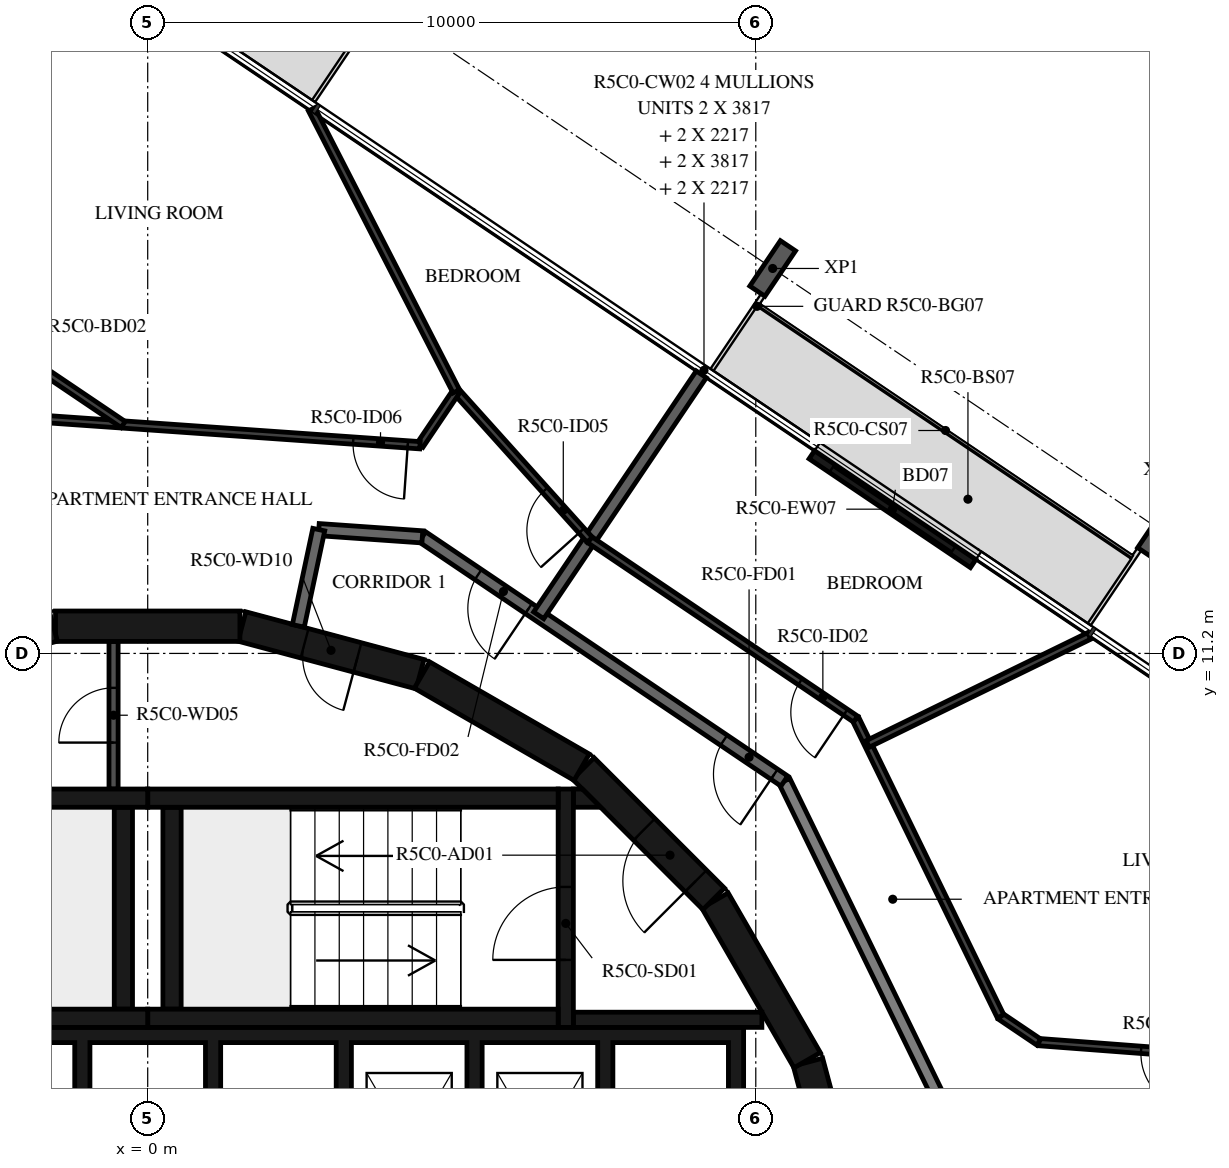
"""IFC4 building model, lengths in metres.
Left out: names, types, materials, properties, quantities, classifications, styles, units other than length and angle.
Written with IfcOpenShell. Run it as: python <this file> out.ifc"""

import sys

from ifc_helpers import new_model, si_unit, direction, frame, frame_2d, origin, origin_2d, place, context, subcontext, project, spatial, polyline, rectangle, i_section, outline, extrude, element, fill, save


model = new_model("IFC4")
c1 = context("Model", 3, precision=1e-05, world=origin(), true_north=direction((0.0, 1.0)))
c2 = subcontext(c1, "Body", "Model", "MODEL_VIEW")
j1 = project(units=[si_unit("LENGTHUNIT", "METRE"), si_unit("PLANEANGLEUNIT", "RADIAN")], contexts=[c1])
p1 = place(None, origin())
s1 = spatial("IfcSite", under=j1, at=p1, CompositionType="ELEMENT")
p2 = place(p1, origin())
s2 = spatial("IfcBuilding", under=s1, at=p2, CompositionType="ELEMENT")
p3 = place(p2, frame((0.0, 0.0, 216.4)))
s3 = spatial("IfcBuildingStorey", under=s2, at=p3, CompositionType="ELEMENT", Elevation=216.4)
for number, where, z_axis, x_axis in (
    (1, (16.656, 13.228, -0.38), (0.0, 0.0, 1.0), (0.829, -0.559, 0.0)),
    (2, (10.278, 17.531, -0.38), (0.0, 0.0, 1.0), (0.829, -0.559, 0.0)),
):
    element("IfcColumn", number, at=place(p3, frame(where, z_axis=z_axis, x_axis=x_axis)), inside=s3, PredefinedType="COLUMN", context=c2, shape_type="SweptSolid", body=[
        extrude(i_section(OverallWidth=0.3, OverallDepth=0.9, WebThickness=0.019, FlangeThickness=0.035, FilletRadius=0.03, at=origin_2d()), origin(), (0.0, 0.0, 1.0), 2.616),
    ])
p4 = place(p3, frame((13.574, 12.677, 0.0), z_axis=(0.0, 0.0, 1.0), x_axis=(-0.829068838882, 0.55914654644, 0.0)))
e3 = element("IfcWall", 3, at=p4, inside=s3, PredefinedType="STANDARD", context=c2, shape_type="SweptSolid", body=[
    extrude(rectangle(XDim=3.2, YDim=0.16, at=frame_2d((1.6, 0.0))), origin(), (0.0, 0.0, 1.0), 3.05),
])
p5 = place(p4, frame((0.4, 0.0, 0.0)))
e4 = element("IfcOpeningElement", 4, at=p5, cuts=e3, PredefinedType="OPENING", context=c2, shape_type="SweptSolid", body=[
    extrude(rectangle(XDim=2.4, YDim=2.4, at=frame_2d((1.2, 1.2))), frame((0.0, 0.09, 0.0), z_axis=(0.0, -1.0, 0.0), x_axis=(1.0, 0.0, 0.0)), (0.0, 0.0, 1.0), 0.18),
])
for number, where, z_axis, x_axis in (
    (5, (11.643, 1.55, 0.0), (0.0, 0.0, 1.0), (-0.259, 0.966, 0.0)),
    (6, (10.845, 4.51, 0.0), (0.0, 0.0, 1.0), (-0.5, 0.866, 0.0)),
):
    element("IfcWall", number, at=place(p3, frame(where, z_axis=z_axis, x_axis=x_axis)), inside=s3, PredefinedType="SHEAR", context=c2, shape_type="SweptSolid", body=[
        extrude(rectangle(XDim=3.033, YDim=0.5, at=frame_2d((1.516, 0.0))), origin(), (0.0, 0.0, 1.0), 3.05),
    ])
p6 = place(p3, frame((9.308, 7.164, 0.0), z_axis=(0.0, 0.0, 1.0), x_axis=(-0.707106781187, 0.707106781187, 0.0)))
e7 = element("IfcWall", 7, at=p6, inside=s3, PredefinedType="SHEAR", context=c2, shape_type="SweptSolid", body=[
    extrude(rectangle(XDim=3.032, YDim=0.5, at=frame_2d((1.516, 0.0))), origin(), (0.0, 0.0, 1.0), 3.05),
])
p7 = place(p6, frame((0.416, 0.0, 0.0)))
e8 = element("IfcOpeningElement", 8, at=p7, cuts=e7, PredefinedType="OPENING", context=c2, shape_type="SweptSolid", body=[
    extrude(rectangle(XDim=1.2, YDim=2.1, at=frame_2d((0.6, 1.05))), frame((0.0, 0.26, 0.0), z_axis=(0.0, -1.0, 0.0), x_axis=(1.0, 0.0, 0.0)), (0.0, 0.0, 1.0), 0.52),
])
p8 = place(p3, frame((7.137, 9.329, 0.0), z_axis=(0.0, 0.0, 1.0), x_axis=(-0.865975092491, 0.500087131594, 0.0)))
e9 = element("IfcWall", 9, at=p8, inside=s3, PredefinedType="SHEAR", context=c2, shape_type="SweptSolid", body=[
    extrude(rectangle(XDim=3.033, YDim=0.5, at=frame_2d((1.516, 0.0))), origin(), (0.0, 0.0, 1.0), 3.05),
])
p9 = place(p3, frame((4.479, 10.858, 0.0), z_axis=(0.0, 0.0, 1.0), x_axis=(-0.965948410781, 0.258734743916, 0.0)))
e10 = element("IfcWall", 10, at=p9, inside=s3, PredefinedType="SHEAR", context=c2, shape_type="SweptSolid", body=[
    extrude(rectangle(XDim=3.033, YDim=0.5, at=frame_2d((1.516, 0.0))), origin(), (0.0, 0.0, 1.0), 3.05),
])
p10 = place(p9, frame((1.066, 0.0, 0.0)))
e11 = element("IfcOpeningElement", 11, at=p10, cuts=e10, PredefinedType="OPENING", context=c2, shape_type="SweptSolid", body=[
    extrude(rectangle(XDim=0.9, YDim=2.1, at=frame_2d((0.45, 1.05))), frame((0.0, 0.26, 0.0), z_axis=(0.0, -1.0, 0.0), x_axis=(1.0, 0.0, 0.0)), (0.0, 0.0, 1.0), 0.52),
])
for number, where, z_axis, x_axis in (
    (12, (1.516, 11.647, 0.0), (0.0, 0.0, 1.0), (-1.0, 0.0, 0.0)),
    (13, (-1.55, 11.643, 0.0), (0.0, 0.0, 1.0), (-0.966, -0.259, 0.0)),
):
    element("IfcWall", number, at=place(p3, frame(where, z_axis=z_axis, x_axis=x_axis)), inside=s3, PredefinedType="SHEAR", context=c2, shape_type="SweptSolid", body=[
        extrude(rectangle(XDim=3.033, YDim=0.5, at=frame_2d((1.516, 0.0))), origin(), (0.0, 0.0, 1.0), 3.05),
    ])
for number, where, z_axis, x_axis in (
    (14, (0.0, 5.2, 0.0), (0.0, 0.0, 1.0), (1.0, 0.0, 0.0)),
    (15, (0.0, 8.82, 0.0), (0.0, 0.0, 1.0), (1.0, 0.0, 0.0)),
):
    element("IfcWall", number, at=place(p3, frame(where, z_axis=z_axis, x_axis=x_axis)), inside=s3, PredefinedType="SHEAR", context=c2, shape_type="SweptSolid", body=[
        extrude(rectangle(XDim=6.75, YDim=0.3, at=frame_2d((3.375, 0.0))), origin(), (0.0, 0.0, 1.0), 3.05),
    ])
p11 = place(p3, frame((0.4, 5.35, 0.0), z_axis=(0.0, 0.0, 1.0), x_axis=(0.0, 1.0, 0.0)))
e16 = element("IfcWall", 16, at=p11, inside=s3, PredefinedType="SHEAR", context=c2, shape_type="SweptSolid", body=[
    extrude(rectangle(XDim=3.32, YDim=0.3, at=frame_2d((1.66, 0.0))), origin(), (0.0, 0.0, 1.0), 3.05),
])
p12 = place(p3, frame((6.875, 5.05, 0.0), z_axis=(0.0, 0.0, 1.0), x_axis=(0.0, 1.0, 0.0)))
e17 = element("IfcWall", 17, at=p12, inside=s3, PredefinedType="SHEAR", context=c2, shape_type="SweptSolid", body=[
    extrude(rectangle(XDim=3.92, YDim=0.25, at=frame_2d((1.96, 0.0))), origin(), (0.0, 0.0, 1.0), 3.05),
])
p13 = place(p12, frame((1.11, 0.0, 0.0)))
e18 = element("IfcOpeningElement", 18, at=p13, cuts=e17, PredefinedType="OPENING", context=c2, shape_type="SweptSolid", body=[
    extrude(rectangle(XDim=1.2, YDim=2.1, at=frame_2d((0.6, 1.05))), frame((0.0, 0.135, 0.0), z_axis=(0.0, -1.0, 0.0), x_axis=(1.0, 0.0, 0.0)), (0.0, 0.0, 1.0), 0.27),
])
p14 = place(p3, frame((7.0, 5.175, 0.0), z_axis=(0.0, 0.0, 1.0), x_axis=(1.0, 0.0, 0.0)))
e19 = element("IfcWall", 19, at=p14, inside=s3, PredefinedType="SHEAR", context=c2, shape_type="SweptSolid", body=[
    extrude(rectangle(XDim=3.1, YDim=0.25, at=frame_2d((1.55, 0.0))), origin(), (0.0, 0.0, 1.0), 3.05),
])
p15 = place(p3, origin())
e20 = element("IfcWall", 20, at=p15, inside=s3, PredefinedType="SHEAR", context=c2, shape_type="SweptSolid", body=[
    extrude(outline(polyline([(7.448, 8.67), (7.0, 8.67), (7.0, 8.97), (7.148, 8.97), (7.448, 8.67)])), origin(), (0.0, 0.0, 1.0), 3.05),
])
for number, where, z_axis, x_axis in (
    (21, (-6.75, 5.2, 0.0), (0.0, 0.0, 1.0), (1.0, 0.0, 0.0)),
    (22, (-6.75, 8.82, 0.0), (0.0, 0.0, 1.0), (1.0, 0.0, 0.0)),
):
    element("IfcWall", number, at=place(p3, frame(where, z_axis=z_axis, x_axis=x_axis)), inside=s3, PredefinedType="SHEAR", context=c2, shape_type="SweptSolid", body=[
        extrude(rectangle(XDim=6.75, YDim=0.3, at=frame_2d((3.375, 0.0))), origin(), (0.0, 0.0, 1.0), 3.05),
    ])
p16 = place(p3, frame((-0.4, 5.35, 0.0), z_axis=(0.0, 0.0, 1.0), x_axis=(0.0, 1.0, 0.0)))
e23 = element("IfcWall", 23, at=p16, inside=s3, PredefinedType="SHEAR", context=c2, shape_type="SweptSolid", body=[
    extrude(rectangle(XDim=3.32, YDim=0.3, at=frame_2d((1.66, 0.0))), origin(), (0.0, 0.0, 1.0), 3.05),
])
p17 = place(p3, origin())
e24 = element("IfcWall", 24, at=p17, inside=s3, PredefinedType="SHEAR", context=c2, shape_type="SweptSolid", body=[
    extrude(outline(polyline([(-9.55, 4.8), (-5.5, 4.8), (-5.5, 1.9), (-5.25, 1.9), (-5.25, 4.8), (-1.2, 4.8), (-1.2, 1.9), (-0.95, 1.9), (-0.95, 4.8), (0.95, 4.8), (0.95, 1.9), (1.2, 1.9), (1.2, 4.8), (3.1, 4.8), (3.1, 1.9), (3.35, 1.9), (3.35, 4.8), (5.25, 4.8), (5.25, 1.9), (5.5, 1.9), (5.5, 4.8), (7.4, 4.8), (7.4, 1.9), (7.65, 1.9), (7.65, 4.8), (9.55, 4.8), (9.55, 1.9), (9.8, 1.9), (9.8, 4.8), (9.8, 5.05), (-9.8, 5.05), (-9.8, 4.8), (-9.8, 1.9), (-9.55, 1.9), (-9.55, 4.8)])), origin(), (0.0, 0.0, 1.0), 3.05),
])
p18 = place(p3, frame((-0.562, 8.97, 0.0), z_axis=(0.0, 0.0, 1.0), x_axis=(0.0, 1.0, 0.0)))
e25 = element("IfcWall", 25, at=p18, inside=s3, PredefinedType="PARTITIONING", context=c2, shape_type="SweptSolid", body=[
    extrude(rectangle(XDim=2.427, YDim=0.15, at=frame_2d((1.214, 0.0))), origin(), (0.0, 0.0, 1.0), 3.05),
])
p19 = place(p18, frame((0.764, 0.0, 0.0)))
e26 = element("IfcOpeningElement", 26, at=p19, cuts=e25, PredefinedType="OPENING", context=c2, shape_type="SweptSolid", body=[
    extrude(rectangle(XDim=0.9, YDim=2.1, at=frame_2d((0.45, 1.05))), frame((0.0, 0.085, 0.0), z_axis=(0.0, -1.0, 0.0), x_axis=(1.0, 0.0, 0.0)), (0.0, 0.0, 1.0), 0.17),
])
p20 = place(p3, frame((13.618, 2.647, 0.0), z_axis=(0.0, 0.0, 1.0), x_axis=(-0.438366026218, 0.898796543751, 0.0)))
e27 = element("IfcWall", 27, at=p20, inside=s3, PredefinedType="STANDARD", context=c2, shape_type="SweptSolid", body=[
    extrude(rectangle(XDim=7.181, YDim=0.2, at=frame_2d((3.591, 0.0))), origin(), (0.0, 0.0, 1.0), 3.05),
])
p21 = place(p3, frame((10.47, 9.101, 0.0), z_axis=(0.0, 0.0, 1.0), x_axis=(-0.829035841718, 0.559195469534, 0.0)))
e28 = element("IfcWall", 28, at=p21, inside=s3, PredefinedType="STANDARD", context=c2, shape_type="SweptSolid", body=[
    extrude(rectangle(XDim=7.181, YDim=0.2, at=frame_2d((3.591, 0.0))), origin(), (0.0, 0.0, 1.0), 3.05),
])
p22 = place(p21, frame((0.2, 0.0, 0.0)))
e29 = element("IfcOpeningElement", 29, at=p22, cuts=e28, PredefinedType="OPENING", context=c2, shape_type="SweptSolid", body=[
    extrude(rectangle(XDim=1.0, YDim=2.1, at=frame_2d((0.5, 1.05))), frame((0.0, 0.11, 0.0), z_axis=(0.0, -1.0, 0.0), x_axis=(1.0, 0.0, 0.0)), (0.0, 0.0, 1.0), 0.22),
])
p23 = place(p21, frame((5.073, 0.0, 0.0)))
e30 = element("IfcOpeningElement", 30, at=p23, cuts=e28, PredefinedType="OPENING", context=c2, shape_type="SweptSolid", body=[
    extrude(rectangle(XDim=1.0, YDim=2.1, at=frame_2d((0.5, 1.05))), frame((0.0, 0.11, 0.0), z_axis=(0.0, -1.0, 0.0), x_axis=(1.0, 0.0, 0.0)), (0.0, 0.0, 1.0), 0.22),
])
p24 = place(p3, frame((4.517, 13.117, 0.0), z_axis=(0.0, 0.0, 1.0), x_axis=(-0.997562153664, 0.069783591025, 0.0)))
e31 = element("IfcWall", 31, at=p24, inside=s3, PredefinedType="STANDARD", context=c2, shape_type="SweptSolid", body=[
    extrude(rectangle(XDim=1.707, YDim=0.2, at=frame_2d((0.854, 0.0))), origin(), (0.0, 0.0, 1.0), 3.05),
])
p25 = place(p3, frame((2.813, 13.236, 0.0), z_axis=(0.0, 0.0, 1.0), x_axis=(-0.207911086063, -0.978147729278, 0.0)))
e32 = element("IfcWall", 32, at=p25, inside=s3, PredefinedType="STANDARD", context=c2, shape_type="SweptSolid", body=[
    extrude(rectangle(XDim=1.618, YDim=0.2, at=frame_2d((0.809, 0.0))), origin(), (0.0, 0.0, 1.0), 3.05),
])
p26 = place(p3, frame((9.104, 15.79, 0.0), z_axis=(0.0, 0.0, 1.0), x_axis=(-0.559193912135, -0.829036892201, 0.0)))
e33 = element("IfcWall", 33, at=p26, inside=s3, PredefinedType="STANDARD", context=c2, shape_type="SweptSolid", body=[
    extrude(rectangle(XDim=4.781, YDim=0.2, at=frame_2d((2.39, 0.0))), origin(), (0.0, 0.0, 1.0), 3.05),
])
p27 = place(p3, frame((17.434, 4.598, 0.0), z_axis=(0.0, 0.0, 1.0), x_axis=(-0.997152077354, 0.075417071205, 0.0)))
e34 = element("IfcWall", 34, at=p27, inside=s3, PredefinedType="PARTITIONING", context=c2, shape_type="SweptSolid", body=[
    extrude(rectangle(XDim=2.787, YDim=0.12, at=frame_2d((1.394, 0.0))), origin(), (0.0, 0.0, 1.0), 3.05),
])
p28 = place(p27, frame((0.2, 0.0, 0.0)))
e35 = element("IfcOpeningElement", 35, at=p28, cuts=e34, PredefinedType="OPENING", context=c2, shape_type="SweptSolid", body=[
    extrude(rectangle(XDim=0.9, YDim=2.1, at=frame_2d((0.45, 1.05))), frame((0.0, 0.07, 0.0), z_axis=(0.0, -1.0, 0.0), x_axis=(1.0, 0.0, 0.0)), (0.0, 0.0, 1.0), 0.14),
])
p29 = place(p3, frame((14.654, 4.808, 0.0), z_axis=(0.0, 0.0, 1.0), x_axis=(-0.829065184024, 0.559151965604, 0.0)))
e36 = element("IfcWall", 36, at=p29, inside=s3, PredefinedType="PARTITIONING", context=c2, shape_type="SweptSolid", body=[
    extrude(rectangle(XDim=0.758, YDim=0.12, at=frame_2d((0.379, 0.0))), origin(), (0.0, 0.0, 1.0), 3.05),
])
p30 = place(p3, frame((14.026, 5.232, 0.0), z_axis=(0.0, 0.0, 1.0), x_axis=(-0.438374985284, 0.89879217413, 0.0)))
e37 = element("IfcWall", 37, at=p30, inside=s3, PredefinedType="PARTITIONING", context=c2, shape_type="SweptSolid", body=[
    extrude(rectangle(XDim=5.438, YDim=0.12, at=frame_2d((2.719, 0.0))), origin(), (0.0, 0.0, 1.0), 3.05),
])
p31 = place(p3, frame((11.642, 10.12, 0.0), z_axis=(0.0, 0.0, 1.0), x_axis=(-0.829054664054, 0.559167563446, 0.0)))
e38 = element("IfcWall", 38, at=p31, inside=s3, PredefinedType="PARTITIONING", context=c2, shape_type="SweptSolid", body=[
    extrude(rectangle(XDim=5.275, YDim=0.12, at=frame_2d((2.637, 0.0))), origin(), (0.0, 0.0, 1.0), 3.05),
])
p32 = place(p31, frame((0.2, 0.0, 0.0)))
e39 = element("IfcOpeningElement", 39, at=p32, cuts=e38, PredefinedType="OPENING", context=c2, shape_type="SweptSolid", body=[
    extrude(rectangle(XDim=0.9, YDim=2.1, at=frame_2d((0.45, 1.05))), frame((0.0, 0.07, 0.0), z_axis=(0.0, -1.0, 0.0), x_axis=(1.0, 0.0, 0.0)), (0.0, 0.0, 1.0), 0.14),
])
p33 = place(p3, frame((15.482, 11.487, 0.0), z_axis=(0.0, 0.0, 1.0), x_axis=(-0.898807251285, -0.438344071521, 0.0)))
e40 = element("IfcWall", 40, at=p33, inside=s3, PredefinedType="PARTITIONING", context=c2, shape_type="SweptSolid", body=[
    extrude(rectangle(XDim=4.051, YDim=0.12, at=frame_2d((2.025, 0.0))), origin(), (0.0, 0.0, 1.0), 3.05),
])
p34 = place(p3, frame((7.269, 13.07, 0.0), z_axis=(0.0, 0.0, 1.0), x_axis=(-0.668495993587, 0.743715743116, 0.0)))
e41 = element("IfcWall", 41, at=p34, inside=s3, PredefinedType="PARTITIONING", context=c2, shape_type="SweptSolid", body=[
    extrude(rectangle(XDim=3.281, YDim=0.12, at=frame_2d((1.641, 0.0))), origin(), (0.0, 0.0, 1.0), 3.05),
])
p35 = place(p34, frame((0.2, 0.0, 0.0)))
e42 = element("IfcOpeningElement", 42, at=p35, cuts=e41, PredefinedType="OPENING", context=c2, shape_type="SweptSolid", body=[
    extrude(rectangle(XDim=0.9, YDim=2.1, at=frame_2d((0.45, 1.05))), frame((0.0, 0.07, 0.0), z_axis=(0.0, -1.0, 0.0), x_axis=(1.0, 0.0, 0.0)), (0.0, 0.0, 1.0), 0.14),
])
p36 = place(p3, frame((5.075, 15.51, 0.0), z_axis=(0.0, 0.0, 1.0), x_axis=(-0.559221936342, -0.829017988896, 0.0)))
e43 = element("IfcWall", 43, at=p36, inside=s3, PredefinedType="PARTITIONING", context=c2, shape_type="SweptSolid", body=[
    extrude(rectangle(XDim=1.07, YDim=0.12, at=frame_2d((0.535, 0.0))), origin(), (0.0, 0.0, 1.0), 3.05),
])
p37 = place(p3, frame((4.477, 14.623, 0.0), z_axis=(0.0, 0.0, 1.0), x_axis=(-0.997564862172, 0.069744861884, 0.0)))
e44 = element("IfcWall", 44, at=p37, inside=s3, PredefinedType="PARTITIONING", context=c2, shape_type="SweptSolid", body=[
    extrude(rectangle(XDim=7.438, YDim=0.12, at=frame_2d((3.719, 0.0))), origin(), (0.0, 0.0, 1.0), 3.05),
])
p38 = place(p37, frame((0.2, 0.0, 0.0)))
e45 = element("IfcOpeningElement", 45, at=p38, cuts=e44, PredefinedType="OPENING", context=c2, shape_type="SweptSolid", body=[
    extrude(rectangle(XDim=0.9, YDim=2.1, at=frame_2d((0.45, 1.05))), frame((0.0, 0.07, 0.0), z_axis=(0.0, -1.0, 0.0), x_axis=(1.0, 0.0, 0.0)), (0.0, 0.0, 1.0), 0.14),
])
p39 = place(p37, frame((6.392, 0.0, 0.0)))
e46 = element("IfcOpeningElement", 46, at=p39, cuts=e44, PredefinedType="OPENING", context=c2, shape_type="SweptSolid", body=[
    extrude(rectangle(XDim=0.8, YDim=2.1, at=frame_2d((0.4, 1.05))), frame((0.0, 0.07, 0.0), z_axis=(0.0, -1.0, 0.0), x_axis=(1.0, 0.0, 0.0)), (0.0, 0.0, 1.0), 0.14),
])
p40 = place(p3, frame((2.696, 20.148, 0.0), z_axis=(0.0, 0.0, 1.0), x_axis=(0.456387956197, -0.889780890691, 0.0)))
e47 = element("IfcWall", 47, at=p40, inside=s3, PredefinedType="PARTITIONING", context=c2, shape_type="SweptSolid", body=[
    extrude(rectangle(XDim=5.213, YDim=0.12, at=frame_2d((2.606, 0.0))), origin(), (0.0, 0.0, 1.0), 3.05),
])
p41 = place(p3, frame((-7.476, 19.735, 0.0), z_axis=(0.0, 0.0, 1.0), x_axis=(0.829035412992, -0.559196105142, 0.0)))
e48 = element("IfcWall", 48, at=p41, inside=s3, PredefinedType="PARTITIONING", context=c2, shape_type="SweptSolid", body=[
    extrude(rectangle(XDim=8.531, YDim=0.12, at=frame_2d((4.266, 0.0))), origin(), (0.0, 0.0, 1.0), 3.05),
])
p42 = place(p41, frame((2.204, 0.0, 0.0)))
e49 = element("IfcOpeningElement", 49, at=p42, cuts=e48, PredefinedType="OPENING", context=c2, shape_type="SweptSolid", body=[
    extrude(rectangle(XDim=0.9, YDim=2.1, at=frame_2d((0.45, 1.05))), frame((0.0, 0.07, 0.0), z_axis=(0.0, -1.0, 0.0), x_axis=(1.0, 0.0, 0.0)), (0.0, 0.0, 1.0), 0.14),
])
p43 = place(p5, origin())
e50 = element("IfcDoor", 50, at=p43, inside=s3, OperationType="DOUBLE_DOOR_SLIDING", PredefinedType="DOOR", context=c2, shape_type="SweptSolid", body=[
    extrude(rectangle(XDim=2.4, YDim=2.4, at=frame_2d((1.2, 1.2))), frame((0.0, 0.025, 0.0), z_axis=(0.0, -1.0, 0.0), x_axis=(1.0, 0.0, 0.0)), (0.0, 0.0, 1.0), 0.05),
])
fill(e4, e50)
p44 = place(p13, origin())
e51 = element("IfcDoor", 51, at=p44, inside=s3, OperationType="SINGLE_SWING_LEFT", PredefinedType="DOOR", context=c2, shape_type="SweptSolid", body=[
    extrude(rectangle(XDim=1.2, YDim=2.1, at=frame_2d((0.6, 1.05))), frame((0.0, 0.025, 0.0), z_axis=(0.0, -1.0, 0.0), x_axis=(1.0, 0.0, 0.0)), (0.0, 0.0, 1.0), 0.05),
])
fill(e18, e51)
p45 = place(p7, origin())
e52 = element("IfcDoor", 52, at=p45, inside=s3, OperationType="SINGLE_SWING_RIGHT", PredefinedType="DOOR", context=c2, shape_type="SweptSolid", body=[
    extrude(rectangle(XDim=1.2, YDim=2.1, at=frame_2d((0.6, 1.05))), frame((0.0, 0.025, 0.0), z_axis=(0.0, -1.0, 0.0), x_axis=(1.0, 0.0, 0.0)), (0.0, 0.0, 1.0), 0.05),
])
fill(e8, e52)
p46 = place(p19, origin())
e53 = element("IfcDoor", 53, at=p46, inside=s3, OperationType="SINGLE_SWING_LEFT", PredefinedType="DOOR", context=c2, shape_type="SweptSolid", body=[
    extrude(rectangle(XDim=0.9, YDim=2.1, at=frame_2d((0.45, 1.05))), frame((0.0, 0.025, 0.0), z_axis=(0.0, -1.0, 0.0), x_axis=(1.0, 0.0, 0.0)), (0.0, 0.0, 1.0), 0.05),
])
fill(e26, e53)
p47 = place(p10, origin())
e54 = element("IfcDoor", 54, at=p47, inside=s3, OperationType="SINGLE_SWING_RIGHT", PredefinedType="DOOR", context=c2, shape_type="SweptSolid", body=[
    extrude(rectangle(XDim=0.9, YDim=2.1, at=frame_2d((0.45, 1.05))), frame((0.0, 0.025, 0.0), z_axis=(0.0, -1.0, 0.0), x_axis=(1.0, 0.0, 0.0)), (0.0, 0.0, 1.0), 0.05),
])
fill(e11, e54)
p48 = place(p22, origin())
e55 = element("IfcDoor", 55, at=p48, inside=s3, OperationType="SINGLE_SWING_LEFT", PredefinedType="DOOR", context=c2, shape_type="SweptSolid", body=[
    extrude(rectangle(XDim=1.0, YDim=2.1, at=frame_2d((0.5, 1.05))), frame((0.0, 0.025, 0.0), z_axis=(0.0, -1.0, 0.0), x_axis=(1.0, 0.0, 0.0)), (0.0, 0.0, 1.0), 0.05),
])
fill(e29, e55)
p49 = place(p28, origin())
e56 = element("IfcDoor", 56, at=p49, inside=s3, OperationType="SINGLE_SWING_LEFT", PredefinedType="DOOR", context=c2, shape_type="SweptSolid", body=[
    extrude(rectangle(XDim=0.9, YDim=2.1, at=frame_2d((0.45, 1.05))), frame((0.0, 0.025, 0.0), z_axis=(0.0, -1.0, 0.0), x_axis=(1.0, 0.0, 0.0)), (0.0, 0.0, 1.0), 0.05),
])
fill(e35, e56)
p50 = place(p32, origin())
e57 = element("IfcDoor", 57, at=p50, inside=s3, OperationType="SINGLE_SWING_LEFT", PredefinedType="DOOR", context=c2, shape_type="SweptSolid", body=[
    extrude(rectangle(XDim=0.9, YDim=2.1, at=frame_2d((0.45, 1.05))), frame((0.0, 0.025, 0.0), z_axis=(0.0, -1.0, 0.0), x_axis=(1.0, 0.0, 0.0)), (0.0, 0.0, 1.0), 0.05),
])
fill(e39, e57)
p51 = place(p23, origin())
e58 = element("IfcDoor", 58, at=p51, inside=s3, OperationType="SINGLE_SWING_RIGHT", PredefinedType="DOOR", context=c2, shape_type="SweptSolid", body=[
    extrude(rectangle(XDim=1.0, YDim=2.1, at=frame_2d((0.5, 1.05))), frame((0.0, 0.025, 0.0), z_axis=(0.0, -1.0, 0.0), x_axis=(1.0, 0.0, 0.0)), (0.0, 0.0, 1.0), 0.05),
])
fill(e30, e58)
p52 = place(p35, origin())
e59 = element("IfcDoor", 59, at=p52, inside=s3, OperationType="SINGLE_SWING_RIGHT", PredefinedType="DOOR", context=c2, shape_type="SweptSolid", body=[
    extrude(rectangle(XDim=0.9, YDim=2.1, at=frame_2d((0.45, 1.05))), frame((0.0, 0.025, 0.0), z_axis=(0.0, -1.0, 0.0), x_axis=(1.0, 0.0, 0.0)), (0.0, 0.0, 1.0), 0.05),
])
fill(e42, e59)
p53 = place(p38, origin())
e60 = element("IfcDoor", 60, at=p53, inside=s3, OperationType="SINGLE_SWING_RIGHT", PredefinedType="DOOR", context=c2, shape_type="SweptSolid", body=[
    extrude(rectangle(XDim=0.9, YDim=2.1, at=frame_2d((0.45, 1.05))), frame((0.0, 0.025, 0.0), z_axis=(0.0, -1.0, 0.0), x_axis=(1.0, 0.0, 0.0)), (0.0, 0.0, 1.0), 0.05),
])
fill(e45, e60)
save(model, sys.argv[1])
